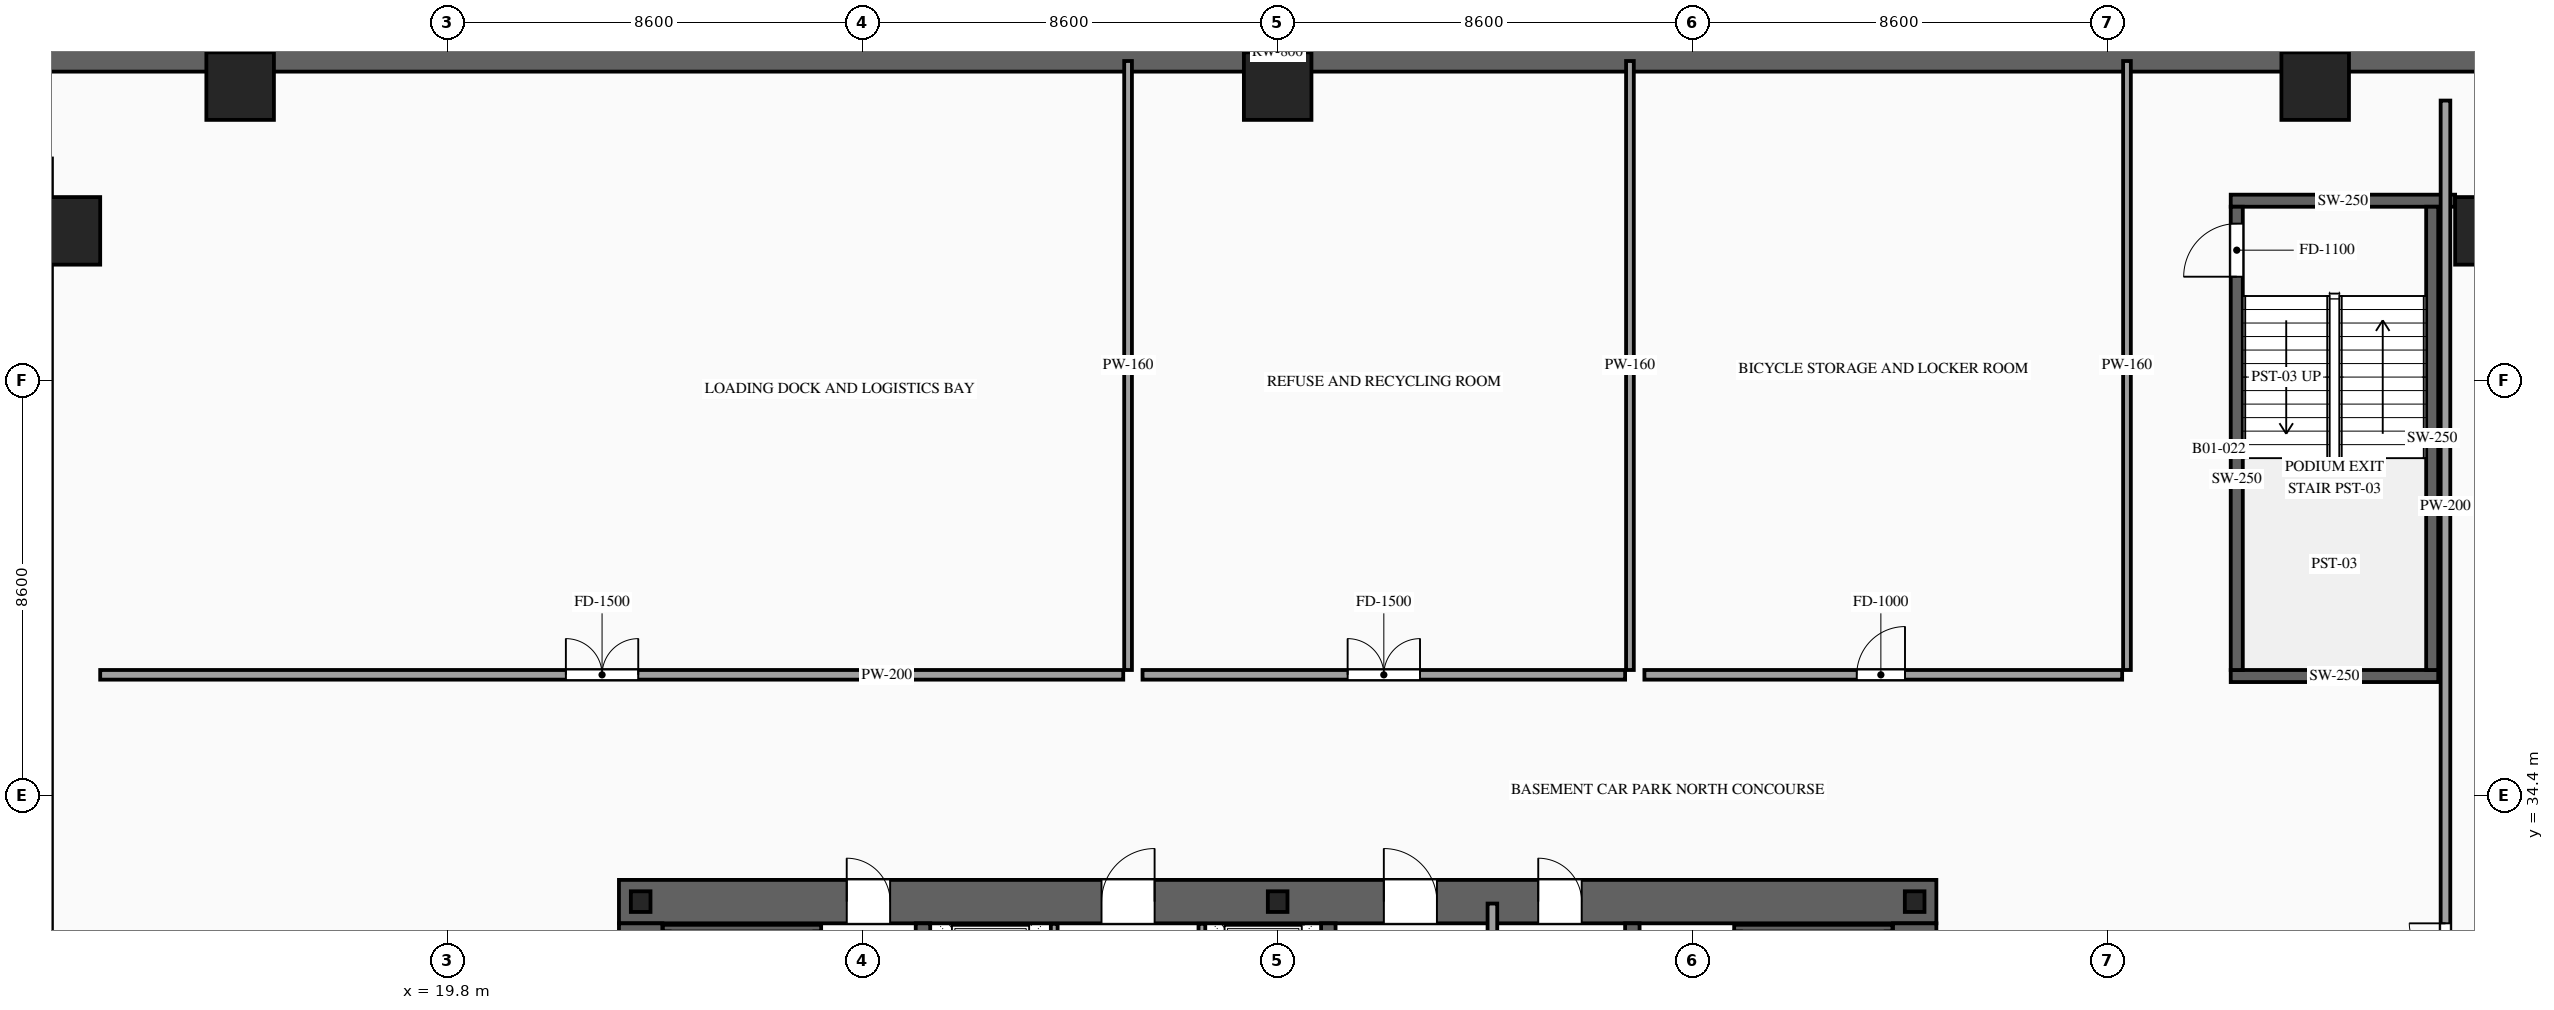
"""IFC4 building model, lengths in metres.
Left out: names, types, materials, properties, quantities, classifications, styles, units other than length and angle.
Written with IfcOpenShell. Run it as: python <this file> out.ifc"""

import sys

from ifc_helpers import new_model, si_unit, direction, frame, frame_2d, origin, origin_2d, place, context, subcontext, project, spatial, rectangle, i_section, extrude, source, transform, mapped, element, fill, save


model = new_model("IFC4")
c1 = context("Model", 3, precision=1e-05, world=origin(), true_north=direction((0.0, 1.0)))
c2 = subcontext(c1, "Body", "Model", "MODEL_VIEW")
j1 = project(units=[si_unit("LENGTHUNIT", "METRE"), si_unit("PLANEANGLEUNIT", "RADIAN")], contexts=[c1])
p1 = place(None, origin())
s1 = spatial("IfcSite", under=j1, at=p1, CompositionType="ELEMENT")
p2 = place(p1, origin())
s2 = spatial("IfcBuilding", under=s1, at=p2, CompositionType="ELEMENT")
p3 = place(p2, frame((0.0, 0.0, -4.5)))
s3 = spatial("IfcBuildingStorey", under=s2, at=p3, CompositionType="ELEMENT", Elevation=-4.5)
m1 = source(origin(), c2, "Body", "SweptSolid", [
    extrude(rectangle(XDim=70.8, YDim=0.8, at=frame_2d((35.4, 0.0))), origin(), (0.0, 0.0, 1.0), 4.5),
])
p4 = place(p3, frame((1.6, 49.8, 0.0), z_axis=(0.0, 0.0, 1.0), x_axis=(1.0, 0.0, 0.0)))
e1 = element("IfcWall", 1, at=p4, inside=s3, PredefinedType="USERDEFINED", context=c2, shape_type="MappedRepresentation", body=[
    mapped(m1, transform((0.0, 0.0, 0.0), scale=1.0)),
])
p5 = place(p3, frame((23.35, 32.2, 0.0), z_axis=(0.0, 0.0, 1.0), x_axis=(1.0, 0.0, 0.0)))
e2 = element("IfcWall", 2, at=p5, inside=s3, PredefinedType="SHEAR", context=c2, shape_type="SweptSolid", body=[
    extrude(rectangle(XDim=27.3, YDim=0.9, at=frame_2d((13.65, 0.0))), origin(), (0.0, 0.0, 1.0), 4.5),
])
p6 = place(p5, frame((4.72, 0.0, 0.0)))
e3 = element("IfcOpeningElement", 3, at=p6, cuts=e2, PredefinedType="OPENING", context=c2, shape_type="SweptSolid", body=[
    extrude(rectangle(XDim=0.9, YDim=2.15, at=frame_2d((0.45, 1.075))), frame((0.0, 0.465, 0.0), z_axis=(0.0, -1.0, 0.0), x_axis=(1.0, 0.0, 0.0)), (0.0, 0.0, 1.0), 0.93),
])
p7 = place(p5, frame((10.0, 0.0, 0.0)))
e4 = element("IfcOpeningElement", 4, at=p7, cuts=e2, PredefinedType="OPENING", context=c2, shape_type="SweptSolid", body=[
    extrude(rectangle(XDim=1.1, YDim=2.2, at=frame_2d((0.55, 1.1))), frame((0.0, 0.465, 0.0), z_axis=(0.0, -1.0, 0.0), x_axis=(1.0, 0.0, 0.0)), (0.0, 0.0, 1.0), 0.93),
])
p8 = place(p5, frame((15.85, 0.0, 0.0)))
e5 = element("IfcOpeningElement", 5, at=p8, cuts=e2, PredefinedType="OPENING", context=c2, shape_type="SweptSolid", body=[
    extrude(rectangle(XDim=1.1, YDim=2.2, at=frame_2d((0.55, 1.1))), frame((0.0, 0.465, 0.0), z_axis=(0.0, -1.0, 0.0), x_axis=(1.0, 0.0, 0.0)), (0.0, 0.0, 1.0), 0.93),
])
p9 = place(p5, frame((19.05, 0.0, 0.0)))
e6 = element("IfcOpeningElement", 6, at=p9, cuts=e2, PredefinedType="OPENING", context=c2, shape_type="SweptSolid", body=[
    extrude(rectangle(XDim=0.9, YDim=2.15, at=frame_2d((0.45, 1.075))), frame((0.0, 0.465, 0.0), z_axis=(0.0, -1.0, 0.0), x_axis=(1.0, 0.0, 0.0)), (0.0, 0.0, 1.0), 0.93),
])
m2 = source(origin(), c2, "Body", "SweptSolid", [
    extrude(rectangle(XDim=11.9, YDim=0.9, at=frame_2d((5.95, 0.0))), origin(), (0.0, 0.0, 1.0), 4.5),
])
for number, where, z_axis, x_axis in (
    (7, (23.8, 19.85, 0.0), (0.0, 0.0, 1.0), (0.0, 1.0, 0.0)),
    (8, (50.2, 19.85, 0.0), (0.0, 0.0, 1.0), (0.0, 1.0, 0.0)),
):
    element("IfcWall", number, at=place(p3, frame(where, z_axis=z_axis, x_axis=x_axis)), inside=s3, PredefinedType="SHEAR", context=c2, shape_type="MappedRepresentation", body=[
        mapped(m2, transform((0.0, 0.0, 0.0), scale=1.0)),
    ])
m3 = source(origin(), c2, "Body", "SweptSolid", [
    extrude(rectangle(XDim=11.9, YDim=0.3, at=frame_2d((5.95, 0.0))), origin(), (0.0, 0.0, 1.0), 4.5),
])
for number, where, z_axis, x_axis in (
    (9, (29.65, 19.85, 0.0), (0.0, 0.0, 1.0), (0.0, 1.0, 0.0)),
    (10, (38.05, 19.85, 0.0), (0.0, 0.0, 1.0), (0.0, 1.0, 0.0)),
    (11, (44.35, 19.85, 0.0), (0.0, 0.0, 1.0), (0.0, 1.0, 0.0)),
):
    element("IfcWall", number, at=place(p3, frame(where, z_axis=z_axis, x_axis=x_axis)), inside=s3, PredefinedType="SOLIDWALL", context=c2, shape_type="MappedRepresentation", body=[
        mapped(m3, transform((0.0, 0.0, 0.0), scale=1.0)),
    ])
m4 = source(origin(), c2, "Body", "SweptSolid", [
    extrude(i_section(OverallWidth=0.407, OverallDepth=0.428, WebThickness=0.02, FlangeThickness=0.035, at=origin_2d()), origin(), (0.0, 0.0, 1.0), 4.5),
])
for number, where, z_axis, x_axis in (
    (12, (23.8, 32.2, 0.0), (0.0, 0.0, 1.0), (1.0, 0.0, 0.0)),
    (13, (37.0, 32.2, 0.0), (0.0, 0.0, 1.0), (1.0, 0.0, 0.0)),
    (14, (50.2, 32.2, 0.0), (0.0, 0.0, 1.0), (1.0, 0.0, 0.0)),
):
    element("IfcColumn", number, at=place(p3, frame(where, z_axis=z_axis, x_axis=x_axis)), inside=s3, PredefinedType="COLUMN", context=c2, shape_type="MappedRepresentation", body=[
        mapped(m4, transform((0.0, 0.0, 0.0), scale=1.0)),
    ])
m5 = source(origin(), c2, "Body", "SweptSolid", [
    extrude(rectangle(XDim=1.4, YDim=1.4, at=origin_2d()), origin(), (0.0, 0.0, 1.0), 4.5),
])
for number, where, z_axis, x_axis in (
    (15, (11.9, 46.1, 0.0), (0.0, 0.0, 1.0), (1.0, 0.0, 0.0)),
    (16, (62.1, 46.1, 0.0), (0.0, 0.0, 1.0), (1.0, 0.0, 0.0)),
    (17, (15.5, 49.1, 0.0), (0.0, 0.0, 1.0), (1.0, 0.0, 0.0)),
    (18, (37.0, 49.1, 0.0), (0.0, 0.0, 1.0), (1.0, 0.0, 0.0)),
    (19, (58.5, 49.1, 0.0), (0.0, 0.0, 1.0), (1.0, 0.0, 0.0)),
):
    element("IfcColumn", number, at=place(p3, frame(where, z_axis=z_axis, x_axis=x_axis)), inside=s3, PredefinedType="COLUMN", context=c2, shape_type="MappedRepresentation", body=[
        mapped(m5, transform((0.0, 0.0, 0.0), scale=1.0)),
    ])
p10 = place(p3, frame((32.37, 29.4, 0.0), z_axis=(0.0, 0.0, 1.0), x_axis=(0.0, 1.0, 0.0)))
e20 = element("IfcWall", 20, at=p10, inside=s3, PredefinedType="SOLIDWALL", context=c2, shape_type="SweptSolid", body=[
    extrude(rectangle(XDim=2.34, YDim=0.14, at=frame_2d((1.17, 0.0))), origin(), (0.0, 0.0, 1.0), 4.2),
])
p11 = place(p10, frame((0.62, 0.0, 0.0)))
e21 = element("IfcOpeningElement", 21, at=p11, cuts=e20, PredefinedType="OPENING", context=c2, shape_type="SweptSolid", body=[
    extrude(rectangle(XDim=1.1, YDim=2.2, at=frame_2d((0.55, 1.1))), frame((0.0, 0.085, 0.0), z_axis=(0.0, -1.0, 0.0), x_axis=(1.0, 0.0, 0.0)), (0.0, 0.0, 1.0), 0.17),
])
p12 = place(p3, frame((35.43, 29.4, 0.0), z_axis=(0.0, 0.0, 1.0), x_axis=(0.0, 1.0, 0.0)))
e22 = element("IfcWall", 22, at=p12, inside=s3, PredefinedType="SOLIDWALL", context=c2, shape_type="SweptSolid", body=[
    extrude(rectangle(XDim=2.34, YDim=0.14, at=frame_2d((1.17, 0.0))), origin(), (0.0, 0.0, 1.0), 4.2),
])
p13 = place(p12, frame((0.62, 0.0, 0.0)))
e23 = element("IfcOpeningElement", 23, at=p13, cuts=e22, PredefinedType="OPENING", context=c2, shape_type="SweptSolid", body=[
    extrude(rectangle(XDim=1.1, YDim=2.2, at=frame_2d((0.55, 1.1))), frame((0.0, 0.085, 0.0), z_axis=(0.0, -1.0, 0.0), x_axis=(1.0, 0.0, 0.0)), (0.0, 0.0, 1.0), 0.17),
])
m6 = source(origin(), c2, "Body", "SweptSolid", [
    extrude(rectangle(XDim=3.28, YDim=0.14, at=frame_2d((1.64, 0.0))), origin(), (0.0, 0.0, 1.0), 4.2),
])
for number, where, z_axis, x_axis in (
    (24, (24.26, 31.65, 0.0), (0.0, 0.0, 1.0), (1.0, 0.0, 0.0)),
    (25, (46.46, 31.65, 0.0), (0.0, 0.0, 1.0), (1.0, 0.0, 0.0)),
):
    element("IfcWall", number, at=place(p3, frame(where, z_axis=z_axis, x_axis=x_axis)), inside=s3, PredefinedType="SOLIDWALL", context=c2, shape_type="MappedRepresentation", body=[
        mapped(m6, transform((0.0, 0.0, 0.0), scale=1.0)),
    ])
m7 = source(origin(), c2, "Body", "SweptSolid", [
    extrude(rectangle(XDim=4.3, YDim=0.25, at=frame_2d((2.15, 0.0))), origin(), (0.0, 0.0, 1.0), 4.2),
])
p14 = place(p3, frame((56.75, 36.875, 0.0), z_axis=(0.0, 0.0, 1.0), x_axis=(1.0, 0.0, 0.0)))
e26 = element("IfcWall", 26, at=p14, inside=s3, PredefinedType="SOLIDWALL", context=c2, shape_type="MappedRepresentation", body=[
    mapped(m7, transform((0.0, 0.0, 0.0), scale=1.0)),
])
m8 = source(origin(), c2, "Body", "SweptSolid", [
    extrude(rectangle(XDim=4.65, YDim=0.25, at=frame_2d((2.325, 0.0))), origin(), (0.0, 0.0, 1.0), 4.2),
])
p15 = place(p3, frame((56.75, 46.725, 0.0), z_axis=(0.0, 0.0, 1.0), x_axis=(1.0, 0.0, 0.0)))
e27 = element("IfcWall", 27, at=p15, inside=s3, PredefinedType="SOLIDWALL", context=c2, shape_type="MappedRepresentation", body=[
    mapped(m8, transform((0.0, 0.0, 0.0), scale=1.0)),
])
p16 = place(p3, frame((56.875, 37.0, 0.0), z_axis=(0.0, 0.0, 1.0), x_axis=(0.0, 1.0, 0.0)))
e28 = element("IfcWall", 28, at=p16, inside=s3, PredefinedType="SOLIDWALL", context=c2, shape_type="SweptSolid", body=[
    extrude(rectangle(XDim=9.6, YDim=0.25, at=frame_2d((4.8, 0.0))), origin(), (0.0, 0.0, 1.0), 4.2),
])
p17 = place(p16, frame((8.15, 0.0, 0.0)))
e29 = element("IfcOpeningElement", 29, at=p17, cuts=e28, PredefinedType="OPENING", context=c2, shape_type="SweptSolid", body=[
    extrude(rectangle(XDim=1.1, YDim=2.2, at=frame_2d((0.55, 1.1))), frame((0.0, 0.14, 0.0), z_axis=(0.0, -1.0, 0.0), x_axis=(1.0, 0.0, 0.0)), (0.0, 0.0, 1.0), 0.28),
])
m9 = source(origin(), c2, "Body", "SweptSolid", [
    extrude(rectangle(XDim=9.6, YDim=0.25, at=frame_2d((4.8, 0.0))), origin(), (0.0, 0.0, 1.0), 4.2),
])
p18 = place(p3, frame((60.925, 37.0, 0.0), z_axis=(0.0, 0.0, 1.0), x_axis=(0.0, 1.0, 0.0)))
e30 = element("IfcWall", 30, at=p18, inside=s3, PredefinedType="SOLIDWALL", context=c2, shape_type="MappedRepresentation", body=[
    mapped(m9, transform((0.0, 0.0, 0.0), scale=1.0)),
])
m10 = source(origin(), c2, "Body", "SweptSolid", [
    extrude(rectangle(XDim=5.96, YDim=0.2, at=frame_2d((2.98, 0.0))), origin(), (0.0, 0.0, 1.0), 4.2),
])
p19 = place(p3, frame((41.45, 26.2, 0.0), z_axis=(0.0, 0.0, 1.0), x_axis=(0.0, 1.0, 0.0)))
e31 = element("IfcWall", 31, at=p19, inside=s3, PredefinedType="PARTITIONING", context=c2, shape_type="MappedRepresentation", body=[
    mapped(m10, transform((0.0, 0.0, 0.0), scale=1.0)),
])
p20 = place(p3, frame((12.6, 36.9, 0.0), z_axis=(0.0, 0.0, 1.0), x_axis=(1.0, 0.0, 0.0)))
e32 = element("IfcWall", 32, at=p20, inside=s3, PredefinedType="PARTITIONING", context=c2, shape_type="SweptSolid", body=[
    extrude(rectangle(XDim=21.2, YDim=0.2, at=frame_2d((10.6, 0.0))), origin(), (0.0, 0.0, 1.0), 4.2),
])
p21 = place(p20, frame((9.65, 0.0, 0.0)))
e33 = element("IfcOpeningElement", 33, at=p21, cuts=e32, PredefinedType="OPENING", context=c2, shape_type="SweptSolid", body=[
    extrude(rectangle(XDim=1.5, YDim=2.3, at=frame_2d((0.75, 1.15))), frame((0.0, 0.115, 0.0), z_axis=(0.0, -1.0, 0.0), x_axis=(1.0, 0.0, 0.0)), (0.0, 0.0, 1.0), 0.23),
])
m11 = source(origin(), c2, "Body", "SweptSolid", [
    extrude(rectangle(XDim=12.62, YDim=0.16, at=frame_2d((6.31, 0.0))), origin(), (0.0, 0.0, 1.0), 4.2),
])
p22 = place(p3, frame((33.9, 37.0, 0.0), z_axis=(0.0, 0.0, 1.0), x_axis=(0.0, 1.0, 0.0)))
e34 = element("IfcWall", 34, at=p22, inside=s3, PredefinedType="PARTITIONING", context=c2, shape_type="MappedRepresentation", body=[
    mapped(m11, transform((0.0, 0.0, 0.0), scale=1.0)),
])
p23 = place(p3, frame((34.2, 36.9, 0.0), z_axis=(0.0, 0.0, 1.0), x_axis=(1.0, 0.0, 0.0)))
e35 = element("IfcWall", 35, at=p23, inside=s3, PredefinedType="PARTITIONING", context=c2, shape_type="SweptSolid", body=[
    extrude(rectangle(XDim=10.0, YDim=0.2, at=frame_2d((5.0, 0.0))), origin(), (0.0, 0.0, 1.0), 4.2),
])
p24 = place(p23, frame((4.25, 0.0, 0.0)))
e36 = element("IfcOpeningElement", 36, at=p24, cuts=e35, PredefinedType="OPENING", context=c2, shape_type="SweptSolid", body=[
    extrude(rectangle(XDim=1.5, YDim=2.3, at=frame_2d((0.75, 1.15))), frame((0.0, 0.115, 0.0), z_axis=(0.0, -1.0, 0.0), x_axis=(1.0, 0.0, 0.0)), (0.0, 0.0, 1.0), 0.23),
])
p25 = place(p3, frame((44.3, 37.0, 0.0), z_axis=(0.0, 0.0, 1.0), x_axis=(0.0, 1.0, 0.0)))
e37 = element("IfcWall", 37, at=p25, inside=s3, PredefinedType="PARTITIONING", context=c2, shape_type="MappedRepresentation", body=[
    mapped(m11, transform((0.0, 0.0, 0.0), scale=1.0)),
])
p26 = place(p3, frame((44.6, 36.9, 0.0), z_axis=(0.0, 0.0, 1.0), x_axis=(1.0, 0.0, 0.0)))
e38 = element("IfcWall", 38, at=p26, inside=s3, PredefinedType="PARTITIONING", context=c2, shape_type="SweptSolid", body=[
    extrude(rectangle(XDim=9.9, YDim=0.2, at=frame_2d((4.95, 0.0))), origin(), (0.0, 0.0, 1.0), 4.2),
])
p27 = place(p26, frame((4.4, 0.0, 0.0)))
e39 = element("IfcOpeningElement", 39, at=p27, cuts=e38, PredefinedType="OPENING", context=c2, shape_type="SweptSolid", body=[
    extrude(rectangle(XDim=1.0, YDim=2.2, at=frame_2d((0.5, 1.1))), frame((0.0, 0.115, 0.0), z_axis=(0.0, -1.0, 0.0), x_axis=(1.0, 0.0, 0.0)), (0.0, 0.0, 1.0), 0.23),
])
p28 = place(p3, frame((54.6, 37.0, 0.0), z_axis=(0.0, 0.0, 1.0), x_axis=(0.0, 1.0, 0.0)))
e40 = element("IfcWall", 40, at=p28, inside=s3, PredefinedType="PARTITIONING", context=c2, shape_type="MappedRepresentation", body=[
    mapped(m11, transform((0.0, 0.0, 0.0), scale=1.0)),
])
p29 = place(p3, frame((61.2, 24.8, 0.0), z_axis=(0.0, 0.0, 1.0), x_axis=(0.0, 1.0, 0.0)))
e41 = element("IfcWall", 41, at=p29, inside=s3, PredefinedType="PARTITIONING", context=c2, shape_type="SweptSolid", body=[
    extrude(rectangle(XDim=24.0, YDim=0.2, at=frame_2d((12.0, 0.0))), origin(), (0.0, 0.0, 1.0), 4.2),
])
p30 = place(p29, frame((5.45, 0.0, 0.0)))
e42 = element("IfcOpeningElement", 42, at=p30, cuts=e41, PredefinedType="OPENING", context=c2, shape_type="SweptSolid", body=[
    extrude(rectangle(XDim=1.5, YDim=2.3, at=frame_2d((0.75, 1.15))), frame((0.0, 0.115, 0.0), z_axis=(0.0, -1.0, 0.0), x_axis=(1.0, 0.0, 0.0)), (0.0, 0.0, 1.0), 0.23),
])
m12 = source(origin(), c2, "Body", "SweptSolid", [
    extrude(rectangle(XDim=1.1, YDim=2.2, at=frame_2d((0.55, 1.1))), frame((0.0, 0.025, 0.0), z_axis=(0.0, -1.0, 0.0), x_axis=(1.0, 0.0, 0.0)), (0.0, 0.0, 1.0), 0.05),
])
p31 = place(p17, origin())
e43 = element("IfcDoor", 43, at=p31, inside=s3, OperationType="SINGLE_SWING_LEFT", PredefinedType="DOOR", context=c2, shape_type="MappedRepresentation", body=[
    mapped(m12, transform((0.0, 0.0, 0.0), scale=1.0)),
])
fill(e29, e43)
m13 = source(origin(), c2, "Body", "SweptSolid", [
    extrude(rectangle(XDim=0.9, YDim=2.15, at=frame_2d((0.45, 1.075))), frame((0.0, 0.025, 0.0), z_axis=(0.0, -1.0, 0.0), x_axis=(1.0, 0.0, 0.0)), (0.0, 0.0, 1.0), 0.05),
])
p32 = place(p6, origin())
e44 = element("IfcDoor", 44, at=p32, inside=s3, OperationType="SINGLE_SWING_LEFT", PredefinedType="DOOR", context=c2, shape_type="MappedRepresentation", body=[
    mapped(m13, transform((0.0, 0.0, 0.0), scale=1.0)),
])
fill(e3, e44)
p33 = place(p7, origin())
e45 = element("IfcDoor", 45, at=p33, inside=s3, OperationType="SINGLE_SWING_RIGHT", PredefinedType="DOOR", context=c2, shape_type="MappedRepresentation", body=[
    mapped(m12, transform((0.0, 0.0, 0.0), scale=1.0)),
])
fill(e4, e45)
p34 = place(p8, origin())
e46 = element("IfcDoor", 46, at=p34, inside=s3, OperationType="SINGLE_SWING_LEFT", PredefinedType="DOOR", context=c2, shape_type="MappedRepresentation", body=[
    mapped(m12, transform((0.0, 0.0, 0.0), scale=1.0)),
])
fill(e5, e46)
p35 = place(p9, origin())
e47 = element("IfcDoor", 47, at=p35, inside=s3, OperationType="SINGLE_SWING_LEFT", PredefinedType="DOOR", context=c2, shape_type="MappedRepresentation", body=[
    mapped(m13, transform((0.0, 0.0, 0.0), scale=1.0)),
])
fill(e6, e47)
m14 = source(origin(), c2, "Body", "SweptSolid", [
    extrude(rectangle(XDim=1.5, YDim=2.3, at=frame_2d((0.75, 1.15))), frame((0.0, 0.025, 0.0), z_axis=(0.0, -1.0, 0.0), x_axis=(1.0, 0.0, 0.0)), (0.0, 0.0, 1.0), 0.05),
])
p36 = place(p21, origin())
e48 = element("IfcDoor", 48, at=p36, inside=s3, OperationType="DOUBLE_DOOR_SINGLE_SWING", PredefinedType="DOOR", context=c2, shape_type="MappedRepresentation", body=[
    mapped(m14, transform((0.0, 0.0, 0.0), scale=1.0)),
])
fill(e33, e48)
p37 = place(p24, origin())
e49 = element("IfcDoor", 49, at=p37, inside=s3, OperationType="DOUBLE_DOOR_SINGLE_SWING", PredefinedType="DOOR", context=c2, shape_type="MappedRepresentation", body=[
    mapped(m14, transform((0.0, 0.0, 0.0), scale=1.0)),
])
fill(e36, e49)
m15 = source(origin(), c2, "Body", "SweptSolid", [
    extrude(rectangle(XDim=1.0, YDim=2.2, at=frame_2d((0.5, 1.1))), frame((0.0, 0.025, 0.0), z_axis=(0.0, -1.0, 0.0), x_axis=(1.0, 0.0, 0.0)), (0.0, 0.0, 1.0), 0.05),
])
p38 = place(p27, origin())
e50 = element("IfcDoor", 50, at=p38, inside=s3, OperationType="SINGLE_SWING_RIGHT", PredefinedType="DOOR", context=c2, shape_type="MappedRepresentation", body=[
    mapped(m15, transform((0.0, 0.0, 0.0), scale=1.0)),
])
fill(e39, e50)
p39 = place(p30, origin())
e51 = element("IfcDoor", 51, at=p39, inside=s3, OperationType="DOUBLE_DOOR_SINGLE_SWING", PredefinedType="DOOR", context=c2, shape_type="MappedRepresentation", body=[
    mapped(m14, transform((0.0, 0.0, 0.0), scale=1.0)),
])
fill(e42, e51)
save(model, sys.argv[1])
